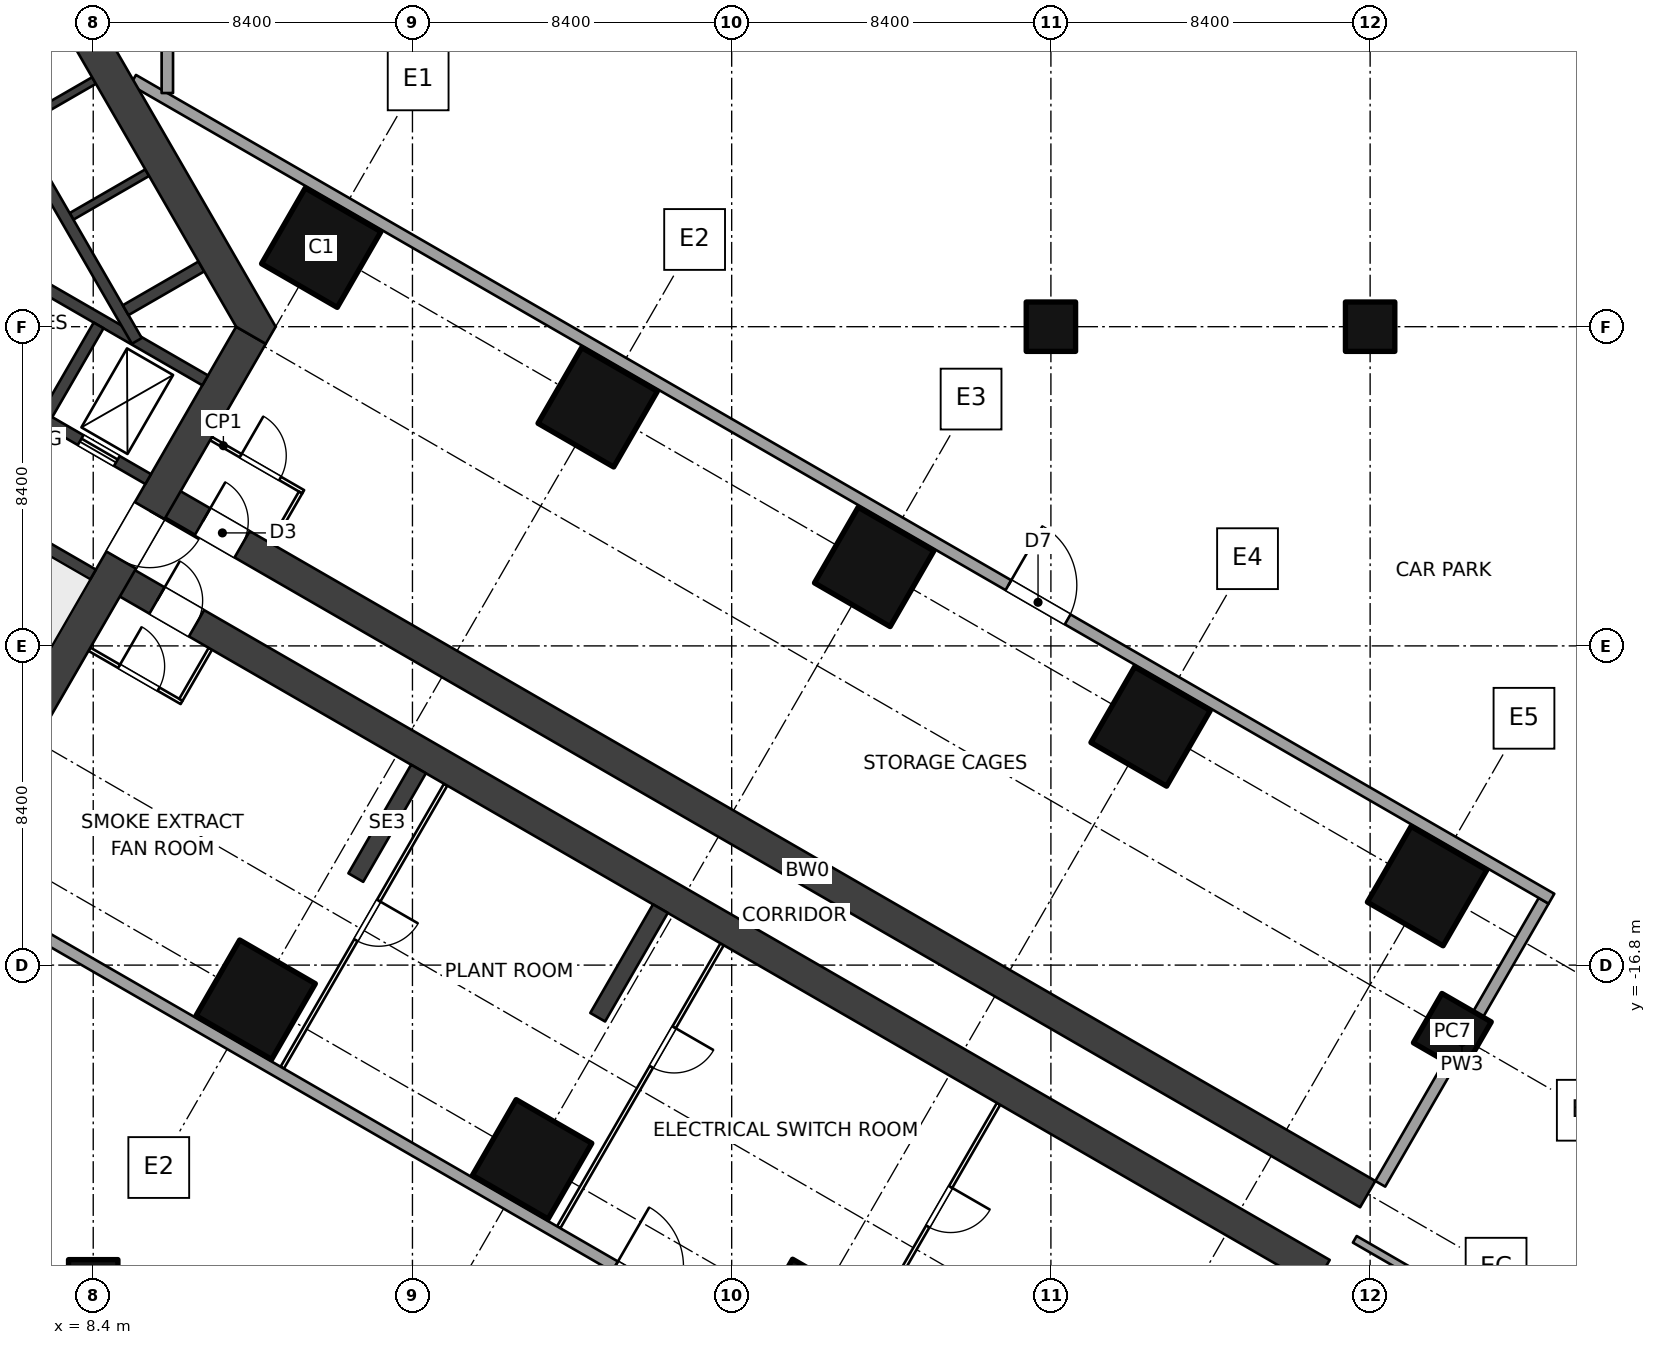
"""IFC4 building model, lengths in metres.
Left out: names, types, materials, properties, quantities, classifications, styles, units other than length and angle.
Written with IfcOpenShell. Run it as: python <this file> out.ifc"""

import sys

from ifc_helpers import new_model, si_unit, direction, frame, frame_2d, origin, origin_2d, place, context, subcontext, project, spatial, polyline, rectangle, outline, extrude, element, fill, save


model = new_model("IFC4")
c1 = context("Model", 3, precision=1e-05, world=origin(), true_north=direction((0.0, 1.0)))
c2 = subcontext(c1, "Body", "Model", "MODEL_VIEW")
j1 = project(units=[si_unit("LENGTHUNIT", "METRE"), si_unit("PLANEANGLEUNIT", "RADIAN")], contexts=[c1])
p1 = place(None, origin())
s1 = spatial("IfcSite", under=j1, at=p1, CompositionType="ELEMENT")
p2 = place(p1, origin())
s2 = spatial("IfcBuilding", under=s1, at=p2, CompositionType="ELEMENT")
p3 = place(p2, frame((0.0, 0.0, -3.5)))
s3 = spatial("IfcBuildingStorey", under=s2, at=p3, CompositionType="ELEMENT", Elevation=-3.5)
for number, where, z_axis, x_axis in (
    (1, (14.4, 2.078, 0.0), (0.0, 0.0, 1.0), (-0.5, -0.866, 0.0)),
    (2, (21.675, -2.122, 0.0), (0.0, 0.0, 1.0), (-0.5, -0.866, 0.0)),
    (3, (12.675, -17.71, 0.0), (0.0, 0.0, 1.0), (-0.5, -0.866, 0.0)),
    (4, (28.949, -6.322, 0.0), (0.0, 0.0, 1.0), (-0.5, -0.866, 0.0)),
    (5, (19.949, -21.91, 0.0), (0.0, 0.0, 1.0), (-0.5, -0.866, 0.0)),
    (6, (36.224, -10.521, 0.0), (0.0, 0.0, 1.0), (-0.5, -0.866, 0.0)),
    (7, (27.224, -26.11, 0.0), (0.0, 0.0, 1.0), (-0.5, -0.866, 0.0)),
    (8, (43.499, -14.721, 0.0), (0.0, 0.0, 1.0), (-0.5, -0.866, 0.0)),
):
    element("IfcColumn", number, at=place(p3, frame(where, z_axis=z_axis, x_axis=x_axis)), inside=s3, PredefinedType="COLUMN", context=c2, shape_type="SweptSolid", body=[
        extrude(rectangle(XDim=2.3, YDim=2.3, at=origin_2d()), origin(), (0.0, 0.0, 1.0), 3.5),
    ])
p4 = place(p3, frame((44.164, -18.57, 0.0), z_axis=(0.0, 0.0, 1.0), x_axis=(-0.5, -0.866025403784, 0.0)))
e9 = element("IfcColumn", 9, at=p4, inside=s3, PredefinedType="COLUMN", context=c2, shape_type="SweptSolid", body=[
    extrude(rectangle(XDim=1.5, YDim=1.5, at=origin_2d()), origin(), (0.0, 0.0, 1.0), 3.5),
])
for number, where, z_axis, x_axis in (
    (10, (8.4, -25.2, 0.0), (0.0, 0.0, 1.0), (1.0, 0.0, 0.0)),
    (11, (33.6, 0.0, 0.0), (0.0, 0.0, 1.0), (1.0, 0.0, 0.0)),
    (12, (42.0, 0.0, 0.0), (0.0, 0.0, 1.0), (1.0, 0.0, 0.0)),
):
    element("IfcColumn", number, at=place(p3, frame(where, z_axis=z_axis, x_axis=x_axis)), inside=s3, PredefinedType="COLUMN", context=c2, shape_type="SweptSolid", body=[
        extrude(rectangle(XDim=1.3, YDim=1.3, at=origin_2d()), origin(), (0.0, 0.0, 1.0), 3.5),
    ])
p5 = place(p3, frame((12.551, -0.225, 0.0), z_axis=(0.0, 0.0, 1.0), x_axis=(-0.499997612506, -0.8660267822, 0.0)))
e13 = element("IfcWall", 13, at=p5, inside=s3, PredefinedType="SHEAR", context=c2, shape_type="SweptSolid", body=[
    extrude(rectangle(XDim=12.161, YDim=0.9, at=frame_2d((6.08, 0.0))), origin(), (0.0, 0.0, 1.0), 3.5),
])
p6 = place(p5, frame((5.33, 0.0, 0.0)))
e14 = element("IfcOpeningElement", 14, at=p6, cuts=e13, PredefinedType="OPENING", context=c2, shape_type="SweptSolid", body=[
    extrude(rectangle(XDim=1.5, YDim=2.1, at=frame_2d((0.75, 1.05))), frame((0.0, 0.46, 0.0), z_axis=(0.0, -1.0, 0.0), x_axis=(1.0, 0.0, 0.0)), (0.0, 0.0, 1.0), 0.92),
])
p7 = place(p3, origin())
e15 = element("IfcWall", 15, at=p7, inside=s3, PredefinedType="SHEAR", context=c2, shape_type="SweptSolid", body=[
    extrude(outline(polyline([(13.2, 0.0), (6.6, 11.432), (6.08, 11.432), (6.08, 10.531), (12.161, 0.0), (12.94, -0.45), (13.2, 0.0)])), origin(), (0.0, 0.0, 1.0), 3.5),
])
p8 = place(p3, frame((2.419, -3.071, 0.0), z_axis=(0.0, 0.0, 1.0), x_axis=(0.86602711848, -0.499997030048, 0.0)))
e16 = element("IfcWall", 16, at=p8, inside=s3, PredefinedType="SHEAR", context=c2, shape_type="SweptSolid", body=[
    extrude(rectangle(XDim=6.901, YDim=0.3, at=frame_2d((3.451, 0.0))), origin(), (0.0, 0.0, 1.0), 3.5),
])
p9 = place(p8, frame((0.25, 0.0, 0.0)))
e17 = element("IfcOpeningElement", 17, at=p9, cuts=e16, PredefinedType="OPENING", context=c2, shape_type="SweptSolid", body=[
    extrude(rectangle(XDim=1.0, YDim=2.1, at=frame_2d((0.5, 1.05))), frame((0.0, 0.16, 0.0), z_axis=(0.0, -1.0, 0.0), x_axis=(1.0, 0.0, 0.0)), (0.0, 0.0, 1.0), 0.32),
])
p10 = place(p3, frame((3.869, -0.559, 0.0), z_axis=(0.0, 0.0, 1.0), x_axis=(0.86602711848, -0.499997030048, 0.0)))
e18 = element("IfcWall", 18, at=p10, inside=s3, PredefinedType="SHEAR", context=c2, shape_type="SweptSolid", body=[
    extrude(rectangle(XDim=6.901, YDim=0.3, at=frame_2d((3.451, 0.0))), origin(), (0.0, 0.0, 1.0), 3.5),
])
p11 = place(p10, frame((4.85, 0.0, 0.0)))
e19 = element("IfcOpeningElement", 19, at=p11, cuts=e18, PredefinedType="OPENING", context=c2, shape_type="SweptSolid", body=[
    extrude(rectangle(XDim=1.1, YDim=2.1, at=frame_2d((0.55, 1.05))), frame((0.0, 0.16, 0.0), z_axis=(0.0, -1.0, 0.0), x_axis=(1.0, 0.0, 0.0)), (0.0, 0.0, 1.0), 0.32),
])
p12 = place(p3, frame((5.369, 2.039, 0.0), z_axis=(0.0, 0.0, 1.0), x_axis=(0.86602711848, -0.499997030048, 0.0)))
e20 = element("IfcWall", 20, at=p12, inside=s3, PredefinedType="SHEAR", context=c2, shape_type="SweptSolid", body=[
    extrude(rectangle(XDim=6.901, YDim=0.3, at=frame_2d((3.451, 0.0))), origin(), (0.0, 0.0, 1.0), 3.5),
])
p13 = place(p3, frame((8.541, 0.034, 0.0), z_axis=(0.0, 0.0, 1.0), x_axis=(-0.50000943426, -0.866019956843, 0.0)))
e21 = element("IfcWall", 21, at=p13, inside=s3, PredefinedType="SHEAR", context=c2, shape_type="SweptSolid", body=[
    extrude(rectangle(XDim=2.7, YDim=0.3, at=frame_2d((1.35, 0.0))), origin(), (0.0, 0.0, 1.0), 3.5),
])
p14 = place(p3, frame((4.45, 8.455, 0.0), z_axis=(0.0, 0.0, 1.0), x_axis=(0.500002290144, -0.866024081565, 0.0)))
e22 = element("IfcWall", 22, at=p14, inside=s3, PredefinedType="SHEAR", context=c2, shape_type="SweptSolid", body=[
    extrude(rectangle(XDim=10.195, YDim=0.3, at=frame_2d((5.098, 0.0))), origin(), (0.0, 0.0, 1.0), 3.5),
])
p15 = place(p3, frame((9.254, 0.435, 0.0), z_axis=(0.0, 0.0, 1.0), x_axis=(0.866007057882, 0.500031774688, 0.0)))
e23 = element("IfcWall", 23, at=p15, inside=s3, PredefinedType="SHEAR", context=c2, shape_type="SweptSolid", body=[
    extrude(rectangle(XDim=2.3, YDim=0.3, at=frame_2d((1.15, 0.0))), origin(), (0.0, 0.0, 1.0), 3.5),
])
for number, where, z_axis, x_axis in (
    (24, (6.429, 5.328, 0.0), (0.0, 0.0, 1.0), (0.866, 0.5, 0.0)),
    (25, (7.829, 2.903, 0.0), (0.0, 0.0, 1.0), (0.866, 0.5, 0.0)),
):
    element("IfcWall", number, at=place(p3, frame(where, z_axis=z_axis, x_axis=x_axis)), inside=s3, PredefinedType="SHEAR", context=c2, shape_type="SweptSolid", body=[
        extrude(rectangle(XDim=2.3, YDim=0.2, at=frame_2d((1.15, 0.0))), origin(), (0.0, 0.0, 1.0), 3.5),
    ])
p16 = place(p3, frame((10.11, -4.451, 0.0), z_axis=(0.0, 0.0, 1.0), x_axis=(0.866025284237, -0.500000207062, 0.0)))
e26 = element("IfcWall", 26, at=p16, inside=s3, PredefinedType="SHEAR", context=c2, shape_type="SweptSolid", body=[
    extrude(rectangle(XDim=36.75, YDim=0.8, at=frame_2d((18.375, 0.0))), origin(), (0.0, 0.0, 1.0), 3.5),
])
p17 = place(p16, frame((1.35, 0.0, 0.0)))
e27 = element("IfcOpeningElement", 27, at=p17, cuts=e26, PredefinedType="OPENING", context=c2, shape_type="SweptSolid", body=[
    extrude(rectangle(XDim=1.2, YDim=2.1, at=frame_2d((0.6, 1.05))), frame((0.0, 0.41, 0.0), z_axis=(0.0, -1.0, 0.0), x_axis=(1.0, 0.0, 0.0)), (0.0, 0.0, 1.0), 0.82),
])
p18 = place(p3, frame((8.91, -6.53, 0.0), z_axis=(0.0, 0.0, 1.0), x_axis=(0.866025284237, -0.500000207062, 0.0)))
e28 = element("IfcWall", 28, at=p18, inside=s3, PredefinedType="SHEAR", context=c2, shape_type="SweptSolid", body=[
    extrude(rectangle(XDim=36.75, YDim=0.8, at=frame_2d((18.375, 0.0))), origin(), (0.0, 0.0, 1.0), 3.5),
])
p19 = place(p18, frame((1.35, 0.0, 0.0)))
e29 = element("IfcOpeningElement", 29, at=p19, cuts=e28, PredefinedType="OPENING", context=c2, shape_type="SweptSolid", body=[
    extrude(rectangle(XDim=1.2, YDim=2.1, at=frame_2d((0.6, 1.05))), frame((0.0, 0.41, 0.0), z_axis=(0.0, -1.0, 0.0), x_axis=(1.0, 0.0, 0.0)), (0.0, 0.0, 1.0), 0.82),
])
p20 = place(p3, frame((11.5, -2.945, 0.0), z_axis=(0.0, 0.0, 1.0), x_axis=(0.866034573852, -0.49998411664, 0.0)))
e30 = element("IfcWall", 30, at=p20, inside=s3, PredefinedType="PARTITIONING", context=c2, shape_type="SweptSolid", body=[
    extrude(rectangle(XDim=2.8, YDim=0.1, at=frame_2d((1.4, 0.0))), origin(), (0.0, 0.0, 1.0), 3.15),
])
p21 = place(p20, frame((0.9, 0.0, 0.0)))
e31 = element("IfcOpeningElement", 31, at=p21, cuts=e30, PredefinedType="OPENING", context=c2, shape_type="SweptSolid", body=[
    extrude(rectangle(XDim=1.2, YDim=2.1, at=frame_2d((0.6, 1.05))), frame((0.0, 0.06, 0.0), z_axis=(0.0, -1.0, 0.0), x_axis=(1.0, 0.0, 0.0)), (0.0, 0.0, 1.0), 0.12),
])
p22 = place(p3, frame((13.082, -5.705, 0.0), z_axis=(0.0, 0.0, 1.0), x_axis=(0.500086022567, 0.865975732936, 0.0)))
e32 = element("IfcWall", 32, at=p22, inside=s3, PredefinedType="PARTITIONING", context=c2, shape_type="SweptSolid", body=[
    extrude(rectangle(XDim=1.55, YDim=0.1, at=frame_2d((0.775, 0.0))), origin(), (0.0, 0.0, 1.0), 3.15),
])
p23 = place(p3, frame((8.3, -8.487, 0.0), z_axis=(0.0, 0.0, 1.0), x_axis=(0.866034573852, -0.49998411664, 0.0)))
e33 = element("IfcWall", 33, at=p23, inside=s3, PredefinedType="PARTITIONING", context=c2, shape_type="SweptSolid", body=[
    extrude(rectangle(XDim=2.8, YDim=0.1, at=frame_2d((1.4, 0.0))), origin(), (0.0, 0.0, 1.0), 3.15),
])
p24 = place(p23, frame((0.9, 0.0, 0.0)))
e34 = element("IfcOpeningElement", 34, at=p24, cuts=e33, PredefinedType="OPENING", context=c2, shape_type="SweptSolid", body=[
    extrude(rectangle(XDim=1.2, YDim=2.1, at=frame_2d((0.6, 1.05))), frame((0.0, 0.06, 0.0), z_axis=(0.0, -1.0, 0.0), x_axis=(1.0, 0.0, 0.0)), (0.0, 0.0, 1.0), 0.12),
])
p25 = place(p3, frame((11.482, -8.476, 0.0), z_axis=(0.0, 0.0, 1.0), x_axis=(-0.500017819788, -0.86601511528, 0.0)))
e35 = element("IfcWall", 35, at=p25, inside=s3, PredefinedType="PARTITIONING", context=c2, shape_type="SweptSolid", body=[
    extrude(rectangle(XDim=1.55, YDim=0.1, at=frame_2d((0.775, 0.0))), origin(), (0.0, 0.0, 1.0), 3.15),
])
p26 = place(p3, frame((17.674, -12.052, 0.0), z_axis=(0.0, 0.0, 1.0), x_axis=(-0.500007509209, -0.866021068297, 0.0)))
e36 = element("IfcWall", 36, at=p26, inside=s3, PredefinedType="PARTITIONING", context=c2, shape_type="SweptSolid", body=[
    extrude(rectangle(XDim=8.6, YDim=0.1, at=frame_2d((4.3, 0.0))), origin(), (0.0, 0.0, 1.0), 3.15),
])
p27 = place(p26, frame((3.525, 0.0, 0.0)))
e37 = element("IfcOpeningElement", 37, at=p27, cuts=e36, PredefinedType="OPENING", context=c2, shape_type="SweptSolid", body=[
    extrude(rectangle(XDim=1.2, YDim=2.1, at=frame_2d((0.6, 1.05))), frame((0.0, 0.06, 0.0), z_axis=(0.0, -1.0, 0.0), x_axis=(1.0, 0.0, 0.0)), (0.0, 0.0, 1.0), 0.12),
])
p28 = place(p3, frame((24.948, -16.251, 0.0), z_axis=(0.0, 0.0, 1.0), x_axis=(-0.500007509209, -0.866021068297, 0.0)))
e38 = element("IfcWall", 38, at=p28, inside=s3, PredefinedType="PARTITIONING", context=c2, shape_type="SweptSolid", body=[
    extrude(rectangle(XDim=8.6, YDim=0.1, at=frame_2d((4.3, 0.0))), origin(), (0.0, 0.0, 1.0), 3.15),
])
p29 = place(p28, frame((2.525, 0.0, 0.0)))
e39 = element("IfcOpeningElement", 39, at=p29, cuts=e38, PredefinedType="OPENING", context=c2, shape_type="SweptSolid", body=[
    extrude(rectangle(XDim=1.2, YDim=2.1, at=frame_2d((0.6, 1.05))), frame((0.0, 0.06, 0.0), z_axis=(0.0, -1.0, 0.0), x_axis=(1.0, 0.0, 0.0)), (0.0, 0.0, 1.0), 0.12),
])
p30 = place(p3, frame((32.223, -20.451, 0.0), z_axis=(0.0, 0.0, 1.0), x_axis=(-0.500007509209, -0.866021068297, 0.0)))
e40 = element("IfcWall", 40, at=p30, inside=s3, PredefinedType="PARTITIONING", context=c2, shape_type="SweptSolid", body=[
    extrude(rectangle(XDim=8.6, YDim=0.1, at=frame_2d((4.3, 0.0))), origin(), (0.0, 0.0, 1.0), 3.15),
])
p31 = place(p30, frame((2.525, 0.0, 0.0)))
e41 = element("IfcOpeningElement", 41, at=p31, cuts=e40, PredefinedType="OPENING", context=c2, shape_type="SweptSolid", body=[
    extrude(rectangle(XDim=1.2, YDim=2.1, at=frame_2d((0.6, 1.05))), frame((0.0, 0.06, 0.0), z_axis=(0.0, -1.0, 0.0), x_axis=(1.0, 0.0, 0.0)), (0.0, 0.0, 1.0), 0.12),
])
p32 = place(p3, frame((41.596, -24.016, 0.0), z_axis=(0.0, 0.0, 1.0), x_axis=(0.866034858292, -0.499983623955, 0.0)))
e42 = element("IfcWall", 42, at=p32, inside=s3, PredefinedType="SOLIDWALL", context=c2, shape_type="SweptSolid", body=[
    extrude(rectangle(XDim=10.627, YDim=0.2, at=frame_2d((5.313, 0.0))), origin(), (0.0, 0.0, 1.0), 3.15),
])
p33 = place(p3, frame((42.267, -22.555, 0.0), z_axis=(0.0, 0.0, 1.0), x_axis=(0.500007509209, 0.866021068297, 0.0)))
e43 = element("IfcWall", 43, at=p33, inside=s3, PredefinedType="SOLIDWALL", context=c2, shape_type="SweptSolid", body=[
    extrude(rectangle(XDim=8.6, YDim=0.3, at=frame_2d((4.3, 0.0))), origin(), (0.0, 0.0, 1.0), 1.55),
])
p34 = place(p3, frame((10.35, 6.149, 0.0), z_axis=(0.0, 0.0, 1.0), x_axis=(0.0, 1.0, 0.0)))
e44 = element("IfcWall", 44, at=p34, inside=s3, PredefinedType="SOLIDWALL", context=c2, shape_type="SweptSolid", body=[
    extrude(rectangle(XDim=41.883, YDim=0.3, at=frame_2d((20.941, 0.0))), origin(), (0.0, 0.0, 1.0), 3.15),
])
p35 = place(p34, frame((25.383, 0.0, 0.0)))
e45 = element("IfcOpeningElement", 45, at=p35, cuts=e44, PredefinedType="OPENING", context=c2, shape_type="SweptSolid", body=[
    extrude(rectangle(XDim=1.8, YDim=2.4, at=frame_2d((0.9, 1.2))), frame((0.0, 0.16, 0.0), z_axis=(0.0, -1.0, 0.0), x_axis=(1.0, 0.0, 0.0)), (0.0, 0.0, 1.0), 0.32),
])
p36 = place(p3, frame((9.45, 6.495, 0.0), z_axis=(0.0, 0.0, 1.0), x_axis=(0.866025301493, -0.500000177174, 0.0)))
e46 = element("IfcWall", 46, at=p36, inside=s3, PredefinedType="SOLIDWALL", context=c2, shape_type="SweptSolid", body=[
    extrude(rectangle(XDim=43.095, YDim=0.3, at=frame_2d((21.548, 0.0))), origin(), (0.0, 0.0, 1.0), 3.15),
])
p37 = place(p36, frame((26.595, 0.0, 0.0)))
e47 = element("IfcOpeningElement", 47, at=p37, cuts=e46, PredefinedType="OPENING", context=c2, shape_type="SweptSolid", body=[
    extrude(rectangle(XDim=1.8, YDim=2.4, at=frame_2d((0.9, 1.2))), frame((0.0, 0.16, 0.0), z_axis=(0.0, -1.0, 0.0), x_axis=(1.0, 0.0, 0.0)), (0.0, 0.0, 1.0), 0.32),
])
p38 = place(p3, frame((-0.9, -11.432, 0.0), z_axis=(0.0, 0.0, 1.0), x_axis=(0.866025301493, -0.500000177174, 0.0)))
e48 = element("IfcWall", 48, at=p38, inside=s3, PredefinedType="SOLIDWALL", context=c2, shape_type="SweptSolid", body=[
    extrude(rectangle(XDim=43.095, YDim=0.3, at=frame_2d((21.548, 0.0))), origin(), (0.0, 0.0, 1.0), 3.15),
])
p39 = place(p38, frame((26.595, 0.0, 0.0)))
e49 = element("IfcOpeningElement", 49, at=p39, cuts=e48, PredefinedType="OPENING", context=c2, shape_type="SweptSolid", body=[
    extrude(rectangle(XDim=1.8, YDim=2.4, at=frame_2d((0.9, 1.2))), frame((0.0, 0.16, 0.0), z_axis=(0.0, -1.0, 0.0), x_axis=(1.0, 0.0, 0.0)), (0.0, 0.0, 1.0), 0.32),
])
for number, where, z_axis, x_axis in (
    (50, (16.959, -11.639, 0.0), (0.0, 0.0, 1.0), (-0.5, -0.866, 0.0)),
    (51, (23.324, -15.314, 0.0), (0.0, 0.0, 1.0), (-0.5, -0.866, 0.0)),
):
    element("IfcWall", number, at=place(p3, frame(where, z_axis=z_axis, x_axis=x_axis)), inside=s3, PredefinedType="SOLIDWALL", context=c2, shape_type="SweptSolid", body=[
        extrude(rectangle(XDim=3.3, YDim=0.45, at=frame_2d((1.65, 0.0))), origin(), (0.0, 0.0, 1.0), 3.5),
    ])
p40 = place(p11, origin())
e52 = element("IfcDoor", 52, at=p40, inside=s3, OperationType="DOUBLE_DOOR_SLIDING", PredefinedType="DOOR", context=c2, shape_type="SweptSolid", body=[
    extrude(rectangle(XDim=1.1, YDim=2.1, at=frame_2d((0.55, 1.05))), frame((0.0, 0.025, 0.0), z_axis=(0.0, -1.0, 0.0), x_axis=(1.0, 0.0, 0.0)), (0.0, 0.0, 1.0), 0.05),
])
fill(e19, e52)
p41 = place(p6, origin())
e53 = element("IfcDoor", 53, at=p41, inside=s3, OperationType="DOUBLE_DOOR_DOUBLE_SWING", PredefinedType="DOOR", context=c2, shape_type="SweptSolid", body=[
    extrude(rectangle(XDim=1.5, YDim=2.1, at=frame_2d((0.75, 1.05))), frame((0.0, 0.025, 0.0), z_axis=(0.0, -1.0, 0.0), x_axis=(1.0, 0.0, 0.0)), (0.0, 0.0, 1.0), 0.05),
])
fill(e14, e53)
p42 = place(p17, origin())
e54 = element("IfcDoor", 54, at=p42, inside=s3, OperationType="DOUBLE_SWING_LEFT", PredefinedType="DOOR", context=c2, shape_type="SweptSolid", body=[
    extrude(rectangle(XDim=1.2, YDim=2.1, at=frame_2d((0.6, 1.05))), frame((0.0, 0.025, 0.0), z_axis=(0.0, -1.0, 0.0), x_axis=(1.0, 0.0, 0.0)), (0.0, 0.0, 1.0), 0.05),
])
fill(e27, e54)
p43 = place(p21, origin())
e55 = element("IfcDoor", 55, at=p43, inside=s3, OperationType="DOUBLE_SWING_LEFT", PredefinedType="DOOR", context=c2, shape_type="SweptSolid", body=[
    extrude(rectangle(XDim=1.2, YDim=2.1, at=frame_2d((0.6, 1.05))), frame((0.0, 0.025, 0.0), z_axis=(0.0, -1.0, 0.0), x_axis=(1.0, 0.0, 0.0)), (0.0, 0.0, 1.0), 0.05),
])
fill(e31, e55)
p44 = place(p19, origin())
e56 = element("IfcDoor", 56, at=p44, inside=s3, OperationType="DOUBLE_SWING_LEFT", PredefinedType="DOOR", context=c2, shape_type="SweptSolid", body=[
    extrude(rectangle(XDim=1.2, YDim=2.1, at=frame_2d((0.6, 1.05))), frame((0.0, 0.025, 0.0), z_axis=(0.0, -1.0, 0.0), x_axis=(1.0, 0.0, 0.0)), (0.0, 0.0, 1.0), 0.05),
])
fill(e29, e56)
p45 = place(p27, origin())
e57 = element("IfcDoor", 57, at=p45, inside=s3, OperationType="DOUBLE_SWING_LEFT", PredefinedType="DOOR", context=c2, shape_type="SweptSolid", body=[
    extrude(rectangle(XDim=1.2, YDim=2.1, at=frame_2d((0.6, 1.05))), frame((0.0, 0.025, 0.0), z_axis=(0.0, -1.0, 0.0), x_axis=(1.0, 0.0, 0.0)), (0.0, 0.0, 1.0), 0.05),
])
fill(e37, e57)
p46 = place(p29, origin())
e58 = element("IfcDoor", 58, at=p46, inside=s3, OperationType="DOUBLE_SWING_LEFT", PredefinedType="DOOR", context=c2, shape_type="SweptSolid", body=[
    extrude(rectangle(XDim=1.2, YDim=2.1, at=frame_2d((0.6, 1.05))), frame((0.0, 0.025, 0.0), z_axis=(0.0, -1.0, 0.0), x_axis=(1.0, 0.0, 0.0)), (0.0, 0.0, 1.0), 0.05),
])
fill(e39, e58)
p47 = place(p31, origin())
e59 = element("IfcDoor", 59, at=p47, inside=s3, OperationType="DOUBLE_SWING_LEFT", PredefinedType="DOOR", context=c2, shape_type="SweptSolid", body=[
    extrude(rectangle(XDim=1.2, YDim=2.1, at=frame_2d((0.6, 1.05))), frame((0.0, 0.025, 0.0), z_axis=(0.0, -1.0, 0.0), x_axis=(1.0, 0.0, 0.0)), (0.0, 0.0, 1.0), 0.05),
])
fill(e41, e59)
p48 = place(p24, origin())
e60 = element("IfcDoor", 60, at=p48, inside=s3, OperationType="DOUBLE_SWING_LEFT", PredefinedType="DOOR", context=c2, shape_type="SweptSolid", body=[
    extrude(rectangle(XDim=1.2, YDim=2.1, at=frame_2d((0.6, 1.05))), frame((0.0, 0.025, 0.0), z_axis=(0.0, -1.0, 0.0), x_axis=(1.0, 0.0, 0.0)), (0.0, 0.0, 1.0), 0.05),
])
fill(e34, e60)
p49 = place(p37, origin())
e61 = element("IfcDoor", 61, at=p49, inside=s3, OperationType="DOUBLE_DOOR_DOUBLE_SWING", PredefinedType="DOOR", context=c2, shape_type="SweptSolid", body=[
    extrude(rectangle(XDim=1.8, YDim=2.4, at=frame_2d((0.9, 1.2))), frame((0.0, 0.025, 0.0), z_axis=(0.0, -1.0, 0.0), x_axis=(1.0, 0.0, 0.0)), (0.0, 0.0, 1.0), 0.05),
])
fill(e47, e61)
save(model, sys.argv[1])
